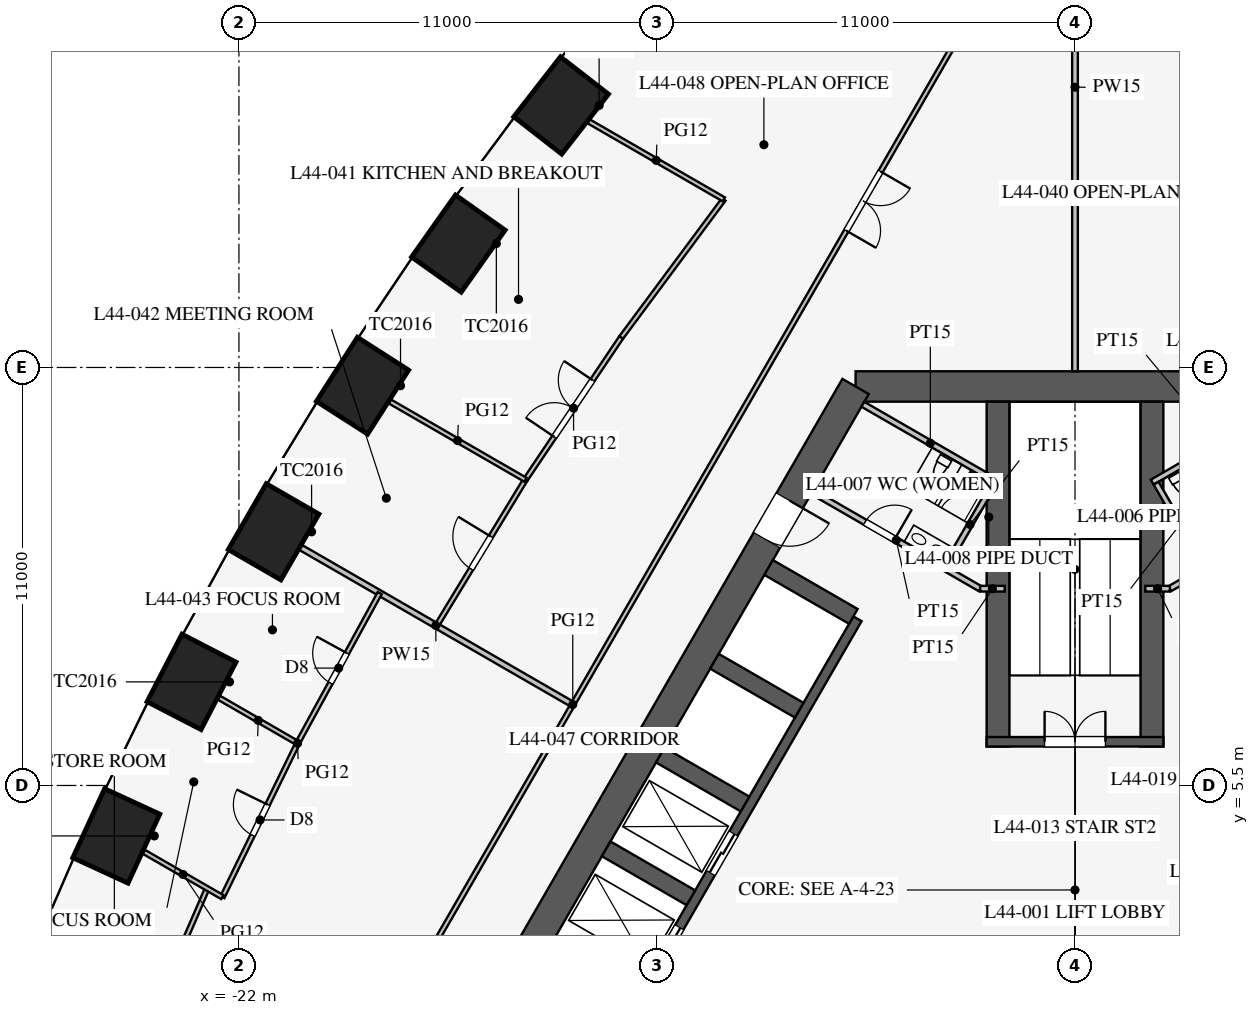
"""IFC4 building model, lengths in metres.
Left out: names, types, materials, properties, quantities, classifications, styles, units other than length and angle.
Written with IfcOpenShell. Run it as: python <this file> out.ifc"""

import sys

from ifc_helpers import new_model, si_unit, direction, frame, frame_2d, origin, origin_2d, place, context, subcontext, project, spatial, rectangle, extrude, element, fill, save


model = new_model("IFC4")
c1 = context("Model", 3, precision=1e-05, world=origin(), true_north=direction((0.0, 1.0)))
c2 = subcontext(c1, "Body", "Model", "MODEL_VIEW")
j1 = project(units=[si_unit("LENGTHUNIT", "METRE"), si_unit("PLANEANGLEUNIT", "RADIAN")], contexts=[c1])
p1 = place(None, origin())
s1 = spatial("IfcSite", under=j1, at=p1, CompositionType="ELEMENT")
p2 = place(p1, origin())
s2 = spatial("IfcBuilding", under=s1, at=p2, CompositionType="ELEMENT")
p3 = place(p2, frame((0.0, 0.0, 193.9)))
s3 = spatial("IfcBuildingStorey", under=s2, at=p3, CompositionType="ELEMENT", Elevation=193.9)
for number, where, z_axis, x_axis in (
    (1, (-13.522, 23.396, 0.0), (0.0, 0.0, 1.0), (-0.615, -0.789, 0.0)),
    (2, (-16.227, 19.761, 0.0), (0.0, 0.0, 1.0), (-0.577, -0.816, 0.0)),
    (3, (-18.748, 16.02, 0.0), (0.0, 0.0, 1.0), (-0.539, -0.842, 0.0)),
    (4, (-21.088, 12.175, 0.0), (0.0, 0.0, 1.0), (-0.5, -0.866, 0.0)),
    (5, (-23.248, 8.226, 0.0), (0.0, 0.0, 1.0), (-0.46, -0.888, 0.0)),
    (6, (-25.227, 4.172, 0.0), (0.0, 0.0, 1.0), (-0.418, -0.908, 0.0)),
):
    element("IfcColumn", number, at=place(p3, frame(where, z_axis=z_axis, x_axis=x_axis)), inside=s3, PredefinedType="COLUMN", context=c2, shape_type="SweptSolid", body=[
        extrude(rectangle(XDim=2.0, YDim=1.6, at=origin_2d()), origin(), (0.0, 0.0, 1.0), 4.2),
    ])
p4 = place(p3, frame((5.773, 16.0, 0.0), z_axis=(0.0, 0.0, 1.0), x_axis=(-1.0, 0.0, 0.0)))
e7 = element("IfcWall", 7, at=p4, inside=s3, PredefinedType="SHEAR", context=c2, shape_type="SweptSolid", body=[
    extrude(rectangle(XDim=11.547, YDim=0.8, at=frame_2d((5.773, 0.0))), origin(), (0.0, 0.0, 1.0), 4.2),
])
p5 = place(p3, frame((-5.773, 16.0, 0.0), z_axis=(0.0, 0.0, 1.0), x_axis=(-0.500002442456, -0.866023993627, 0.0)))
e8 = element("IfcWall", 8, at=p5, inside=s3, PredefinedType="SHEAR", context=c2, shape_type="SweptSolid", body=[
    extrude(rectangle(XDim=21.939, YDim=0.8, at=frame_2d((10.97, 0.0))), origin(), (0.0, 0.0, 1.0), 4.2),
])
p6 = place(p5, frame((17.27, 0.0, 0.0)))
e9 = element("IfcOpeningElement", 9, at=p6, cuts=e8, PredefinedType="OPENING", context=c2, shape_type="SweptSolid", body=[
    extrude(rectangle(XDim=1.2, YDim=2.1, at=frame_2d((0.6, 1.05))), frame((0.0, 0.41, 0.0), z_axis=(0.0, -1.0, 0.0), x_axis=(1.0, 0.0, 0.0)), (0.0, 0.0, 1.0), 0.82),
])
p7 = place(p5, frame((3.47, 0.0, 0.0)))
e10 = element("IfcOpeningElement", 10, at=p7, cuts=e8, PredefinedType="OPENING", context=c2, shape_type="SweptSolid", body=[
    extrude(rectangle(XDim=1.2, YDim=2.1, at=frame_2d((0.6, 1.05))), frame((0.0, 0.41, 0.0), z_axis=(0.0, -1.0, 0.0), x_axis=(1.0, 0.0, 0.0)), (0.0, 0.0, 1.0), 0.82),
])
p8 = place(p3, frame((-5.724, 9.886, 0.0), z_axis=(0.0, 0.0, 1.0), x_axis=(-0.500001763848, -0.866024385424, 0.0)))
e11 = element("IfcWall", 11, at=p8, inside=s3, PredefinedType="SHEAR", context=c2, shape_type="SweptSolid", body=[
    extrude(rectangle(XDim=11.4, YDim=0.25, at=frame_2d((5.7, 0.0))), origin(), (0.0, 0.0, 1.0), 4.2),
])
p9 = place(p8, frame((6.525, 0.0, 0.0)))
e12 = element("IfcOpeningElement", 12, at=p9, cuts=e11, PredefinedType="OPENING", context=c2, shape_type="SweptSolid", body=[
    extrude(rectangle(XDim=1.2, YDim=2.2, at=frame_2d((0.6, 1.1))), frame((0.0, 0.135, 0.0), z_axis=(0.0, -1.0, 0.0), x_axis=(1.0, 0.0, 0.0)), (0.0, 0.0, 1.0), 0.27),
])
p10 = place(p8, frame((9.375, 0.0, 0.0)))
e13 = element("IfcOpeningElement", 13, at=p10, cuts=e11, PredefinedType="OPENING", context=c2, shape_type="SweptSolid", body=[
    extrude(rectangle(XDim=1.2, YDim=2.2, at=frame_2d((0.6, 1.1))), frame((0.0, 0.135, 0.0), z_axis=(0.0, -1.0, 0.0), x_axis=(1.0, 0.0, 0.0)), (0.0, 0.0, 1.0), 0.27),
])
p11 = place(p3, frame((-5.832, 9.949, 0.0), z_axis=(0.0, 0.0, 1.0), x_axis=(-0.866029291668, 0.499993265928, 0.0)))
e14 = element("IfcWall", 14, at=p11, inside=s3, PredefinedType="SHEAR", context=c2, shape_type="SweptSolid", body=[
    extrude(rectangle(XDim=2.575, YDim=0.45, at=frame_2d((1.288, 0.0))), origin(), (0.0, 0.0, 1.0), 4.2),
])
for number, where, z_axis, x_axis in (
    (15, (-7.257, 7.481, 0.0), (0.0, 0.0, 1.0), (-0.866, 0.5, 0.0)),
    (16, (-8.682, 5.012, 0.0), (0.0, 0.0, 1.0), (-0.866, 0.5, 0.0)),
    (17, (-10.107, 2.544, 0.0), (0.0, 0.0, 1.0), (-0.866, 0.5, 0.0)),
):
    element("IfcWall", number, at=place(p3, frame(where, z_axis=z_axis, x_axis=x_axis)), inside=s3, PredefinedType="SHEAR", context=c2, shape_type="SweptSolid", body=[
        extrude(rectangle(XDim=2.575, YDim=0.45, at=frame_2d((1.288, 0.0))), origin(), (0.0, 0.0, 1.0), 4.2),
    ])
for number, where, z_axis, x_axis in (
    (18, (2.025, 6.525, 0.0), (0.0, 0.0, 1.0), (0.0, 1.0, 0.0)),
    (19, (-2.025, 6.525, 0.0), (0.0, 0.0, 1.0), (0.0, 1.0, 0.0)),
):
    element("IfcWall", number, at=place(p3, frame(where, z_axis=z_axis, x_axis=x_axis)), inside=s3, PredefinedType="SHEAR", context=c2, shape_type="SweptSolid", body=[
        extrude(rectangle(XDim=9.075, YDim=0.6, at=frame_2d((4.538, 0.0))), origin(), (0.0, 0.0, 1.0), 4.2),
    ])
p12 = place(p3, frame((2.325, 6.65, 0.0), z_axis=(0.0, 0.0, 1.0), x_axis=(-1.0, 0.0, 0.0)))
e20 = element("IfcWall", 20, at=p12, inside=s3, PredefinedType="SHEAR", context=c2, shape_type="SweptSolid", body=[
    extrude(rectangle(XDim=4.65, YDim=0.25, at=frame_2d((2.325, 0.0))), origin(), (0.0, 0.0, 1.0), 4.2),
])
p13 = place(p12, frame((1.525, 0.0, 0.0)))
e21 = element("IfcOpeningElement", 21, at=p13, cuts=e20, PredefinedType="OPENING", context=c2, shape_type="SweptSolid", body=[
    extrude(rectangle(XDim=1.6, YDim=2.1, at=frame_2d((0.8, 1.05))), frame((0.0, 0.135, 0.0), z_axis=(0.0, -1.0, 0.0), x_axis=(1.0, 0.0, 0.0)), (0.0, 0.0, 1.0), 0.27),
])
p14 = place(p3, frame((2.495, 10.678, 0.0), z_axis=(0.0, 0.0, 1.0), x_axis=(0.86602216432, 0.500005610874, 0.0)))
e22 = element("IfcWall", 22, at=p14, inside=s3, PredefinedType="PARTITIONING", context=c2, shape_type="SweptSolid", body=[
    extrude(rectangle(XDim=5.1, YDim=0.15, at=frame_2d((2.55, 0.0))), origin(), (0.0, 0.0, 1.0), 4.0),
])
p15 = place(p14, frame((1.3, 0.0, 0.0)))
e23 = element("IfcOpeningElement", 23, at=p15, cuts=e22, PredefinedType="OPENING", context=c2, shape_type="SweptSolid", body=[
    extrude(rectangle(XDim=0.9, YDim=2.1, at=frame_2d((0.45, 1.05))), frame((0.0, 0.085, 0.0), z_axis=(0.0, -1.0, 0.0), x_axis=(1.0, 0.0, 0.0)), (0.0, 0.0, 1.0), 0.17),
])
p16 = place(p3, frame((-2.495, 10.678, 0.0), z_axis=(0.0, 0.0, 1.0), x_axis=(-0.86602216432, 0.500005610874, 0.0)))
e24 = element("IfcWall", 24, at=p16, inside=s3, PredefinedType="PARTITIONING", context=c2, shape_type="SweptSolid", body=[
    extrude(rectangle(XDim=5.1, YDim=0.15, at=frame_2d((2.55, 0.0))), origin(), (0.0, 0.0, 1.0), 4.0),
])
p17 = place(p16, frame((2.6, 0.0, 0.0)))
e25 = element("IfcOpeningElement", 25, at=p17, cuts=e24, PredefinedType="OPENING", context=c2, shape_type="SweptSolid", body=[
    extrude(rectangle(XDim=0.9, YDim=2.1, at=frame_2d((0.45, 1.05))), frame((0.0, 0.085, 0.0), z_axis=(0.0, -1.0, 0.0), x_axis=(1.0, 0.0, 0.0)), (0.0, 0.0, 1.0), 0.17),
])
for number, where, z_axis, x_axis in (
    (26, (2.495, 10.678, 0.0), (0.0, 0.0, 1.0), (-1.0, 0.0, 0.0)),
    (27, (-2.495, 10.678, 0.0), (0.0, 0.0, 1.0), (1.0, 0.0, 0.0)),
):
    element("IfcWall", number, at=place(p3, frame(where, z_axis=z_axis, x_axis=x_axis)), inside=s3, PredefinedType="PARTITIONING", context=c2, shape_type="SweptSolid", body=[
        extrude(rectangle(XDim=0.645, YDim=0.15, at=frame_2d((0.323, 0.0))), origin(), (0.0, 0.0, 1.0), 4.0),
    ])
p18 = place(p3, frame((2.031, 13.482, 0.0), z_axis=(0.0, 0.0, 1.0), x_axis=(0.866050731258, 0.499956128963, 0.0)))
e28 = element("IfcWall", 28, at=p18, inside=s3, PredefinedType="PARTITIONING", context=c2, shape_type="SweptSolid", body=[
    extrude(rectangle(XDim=4.1, YDim=0.15, at=frame_2d((2.05, 0.0))), origin(), (0.0, 0.0, 1.0), 4.0),
])
p19 = place(p3, frame((3.389, 11.281, 0.0), z_axis=(0.0, 0.0, 1.0), x_axis=(-0.499989096993, 0.866031698547, 0.0)))
e29 = element("IfcWall", 29, at=p19, inside=s3, PredefinedType="PARTITIONING", context=c2, shape_type="SweptSolid", body=[
    extrude(rectangle(XDim=2.51, YDim=0.15, at=frame_2d((1.255, 0.0))), origin(), (0.0, 0.0, 1.0), 4.0),
])
p20 = place(p3, frame((-2.031, 13.482, 0.0), z_axis=(0.0, 0.0, 1.0), x_axis=(-0.866050731258, 0.499956128963, 0.0)))
e30 = element("IfcWall", 30, at=p20, inside=s3, PredefinedType="PARTITIONING", context=c2, shape_type="SweptSolid", body=[
    extrude(rectangle(XDim=4.1, YDim=0.15, at=frame_2d((2.05, 0.0))), origin(), (0.0, 0.0, 1.0), 4.0),
])
p21 = place(p3, frame((-3.389, 11.281, 0.0), z_axis=(0.0, 0.0, 1.0), x_axis=(0.499989096993, 0.866031698547, 0.0)))
e31 = element("IfcWall", 31, at=p21, inside=s3, PredefinedType="PARTITIONING", context=c2, shape_type="SweptSolid", body=[
    extrude(rectangle(XDim=2.51, YDim=0.15, at=frame_2d((1.255, 0.0))), origin(), (0.0, 0.0, 1.0), 4.0),
])
p22 = place(p3, frame((0.0, 16.4, 0.0), z_axis=(0.0, 0.0, 1.0), x_axis=(0.0, 1.0, 0.0)))
e32 = element("IfcWall", 32, at=p22, inside=s3, PredefinedType="PARTITIONING", context=c2, shape_type="SweptSolid", body=[
    extrude(rectangle(XDim=14.95, YDim=0.15, at=frame_2d((7.475, 0.0))), origin(), (0.0, 0.0, 1.0), 2.4),
])
p23 = place(p3, frame((26.415, -15.231, 0.0), z_axis=(0.0, 0.0, 1.0), x_axis=(-0.50000091641, 0.866024874695, 0.0)))
e33 = element("IfcWall", 33, at=p23, inside=s3, PredefinedType="PARTITIONING", context=c2, shape_type="SweptSolid", body=[
    extrude(rectangle(XDim=52.796, YDim=0.12, at=frame_2d((26.398, 0.0))), origin(), (0.0, 0.0, 1.0), 2.9),
])
p24 = place(p23, frame((10.2, 0.0, 0.15)))
e34 = element("IfcOpeningElement", 34, at=p24, cuts=e33, PredefinedType="OPENING", context=c2, shape_type="SweptSolid", body=[
    extrude(rectangle(XDim=1.8, YDim=2.1, at=frame_2d((0.9, 1.05))), frame((0.0, 0.07, 0.0), z_axis=(0.0, -1.0, 0.0), x_axis=(1.0, 0.0, 0.0)), (0.0, 0.0, 1.0), 0.14),
])
p25 = place(p23, frame((40.8, 0.0, 0.15)))
e35 = element("IfcOpeningElement", 35, at=p25, cuts=e33, PredefinedType="OPENING", context=c2, shape_type="SweptSolid", body=[
    extrude(rectangle(XDim=1.8, YDim=2.1, at=frame_2d((0.9, 1.05))), frame((0.0, 0.07, 0.0), z_axis=(0.0, -1.0, 0.0), x_axis=(1.0, 0.0, 0.0)), (0.0, 0.0, 1.0), 0.14),
])
p26 = place(p3, frame((-13.268, 7.66, 0.0), z_axis=(0.0, 0.0, 1.0), x_axis=(-0.866019499219, 0.500010226868, 0.0)))
e36 = element("IfcWall", 36, at=p26, inside=s3, PredefinedType="PARTITIONING", context=c2, shape_type="SweptSolid", body=[
    extrude(rectangle(XDim=8.2, YDim=0.15, at=frame_2d((4.1, 0.0))), origin(), (0.0, 0.0, 1.0), 2.992),
])
p27 = place(p3, frame((-0.016, 30.491, 0.0), z_axis=(0.0, 0.0, 1.0), x_axis=(-0.50000091641, -0.866024874695, 0.0)))
e37 = element("IfcWall", 37, at=p27, inside=s3, PredefinedType="PARTITIONING", context=c2, shape_type="SweptSolid", body=[
    extrude(rectangle(XDim=52.796, YDim=0.12, at=frame_2d((26.398, 0.0))), origin(), (0.0, 0.0, 1.0), 2.9),
])
p28 = place(p27, frame((10.2, 0.0, 0.15)))
e38 = element("IfcOpeningElement", 38, at=p28, cuts=e37, PredefinedType="OPENING", context=c2, shape_type="SweptSolid", body=[
    extrude(rectangle(XDim=1.8, YDim=2.1, at=frame_2d((0.9, 1.05))), frame((0.0, 0.07, 0.0), z_axis=(0.0, -1.0, 0.0), x_axis=(1.0, 0.0, 0.0)), (0.0, 0.0, 1.0), 0.14),
])
p29 = place(p27, frame((40.8, 0.0, 0.15)))
e39 = element("IfcOpeningElement", 39, at=p29, cuts=e37, PredefinedType="OPENING", context=c2, shape_type="SweptSolid", body=[
    extrude(rectangle(XDim=1.8, YDim=2.1, at=frame_2d((0.9, 1.05))), frame((0.0, 0.07, 0.0), z_axis=(0.0, -1.0, 0.0), x_axis=(1.0, 0.0, 0.0)), (0.0, 0.0, 1.0), 0.14),
])
p30 = place(p3, frame((-18.295, 10.563, 0.0), z_axis=(0.0, 0.0, 1.0), x_axis=(-0.479972822547, -0.877283357654, 0.0)))
e40 = element("IfcWall", 40, at=p30, inside=s3, PredefinedType="PARTITIONING", context=c2, shape_type="SweptSolid", body=[
    extrude(rectangle(XDim=4.501, YDim=0.12, at=frame_2d((2.25, 0.0))), origin(), (0.0, 0.0, 1.0), 2.9),
])
p31 = place(p30, frame((1.8, 0.0, 0.15)))
e41 = element("IfcOpeningElement", 41, at=p31, cuts=e40, PredefinedType="OPENING", context=c2, shape_type="SweptSolid", body=[
    extrude(rectangle(XDim=0.9, YDim=2.1, at=frame_2d((0.45, 1.05))), frame((0.0, 0.07, 0.0), z_axis=(0.0, -1.0, 0.0), x_axis=(1.0, 0.0, 0.0)), (0.0, 0.0, 1.0), 0.14),
])
p32 = place(p3, frame((-20.456, 6.614, 0.0), z_axis=(0.0, 0.0, 1.0), x_axis=(-0.43911984878, -0.898428493764, 0.0)))
e42 = element("IfcWall", 42, at=p32, inside=s3, PredefinedType="PARTITIONING", context=c2, shape_type="SweptSolid", body=[
    extrude(rectangle(XDim=4.511, YDim=0.12, at=frame_2d((2.255, 0.0))), origin(), (0.0, 0.0, 1.0), 2.9),
])
p33 = place(p32, frame((1.8, 0.0, 0.15)))
e43 = element("IfcOpeningElement", 43, at=p33, cuts=e42, PredefinedType="OPENING", context=c2, shape_type="SweptSolid", body=[
    extrude(rectangle(XDim=0.9, YDim=2.1, at=frame_2d((0.45, 1.05))), frame((0.0, 0.07, 0.0), z_axis=(0.0, -1.0, 0.0), x_axis=(1.0, 0.0, 0.0)), (0.0, 0.0, 1.0), 0.14),
])
p34 = place(p3, frame((-22.835, 2.792, 0.0), z_axis=(0.0, 0.0, 1.0), x_axis=(-0.397208101111, -0.917728567939, 0.0)))
e44 = element("IfcWall", 44, at=p34, inside=s3, PredefinedType="PARTITIONING", context=c2, shape_type="SweptSolid", body=[
    extrude(rectangle(XDim=4.53, YDim=0.12, at=frame_2d((2.265, 0.0))), origin(), (0.0, 0.0, 1.0), 2.9),
])
p35 = place(p34, frame((1.8, 0.0, 0.15)))
e45 = element("IfcOpeningElement", 45, at=p35, cuts=e44, PredefinedType="OPENING", context=c2, shape_type="SweptSolid", body=[
    extrude(rectangle(XDim=0.9, YDim=2.1, at=frame_2d((0.45, 1.05))), frame((0.0, 0.07, 0.0), z_axis=(0.0, -1.0, 0.0), x_axis=(1.0, 0.0, 0.0)), (0.0, 0.0, 1.0), 0.14),
])
p36 = place(p3, frame((-9.242, 20.924, 0.0), z_axis=(0.0, 0.0, 1.0), x_axis=(-0.59613842716, -0.802881669777, 0.0)))
e46 = element("IfcWall", 46, at=p36, inside=s3, PredefinedType="PARTITIONING", context=c2, shape_type="SweptSolid", body=[
    extrude(rectangle(XDim=4.53, YDim=0.12, at=frame_2d((2.265, 0.0))), origin(), (0.0, 0.0, 1.0), 2.9),
])
p37 = place(p3, frame((-14.462, 13.546, 0.0), z_axis=(0.0, 0.0, 1.0), x_axis=(-0.519790350351, -0.85429385558, 0.0)))
e47 = element("IfcWall", 47, at=p37, inside=s3, PredefinedType="PARTITIONING", context=c2, shape_type="SweptSolid", body=[
    extrude(rectangle(XDim=4.501, YDim=0.12, at=frame_2d((2.25, 0.0))), origin(), (0.0, 0.0, 1.0), 2.9),
])
p38 = place(p37, frame((1.75, 0.0, 0.15)))
e48 = element("IfcOpeningElement", 48, at=p38, cuts=e47, PredefinedType="OPENING", context=c2, shape_type="SweptSolid", body=[
    extrude(rectangle(XDim=1.0, YDim=2.1, at=frame_2d((0.5, 1.05))), frame((0.0, 0.07, 0.0), z_axis=(0.0, -1.0, 0.0), x_axis=(1.0, 0.0, 0.0)), (0.0, 0.0, 1.0), 0.14),
])
p39 = place(p3, frame((-11.943, 17.287, 0.0), z_axis=(0.0, 0.0, 1.0), x_axis=(-0.55850386778, -0.829501916619, 0.0)))
e49 = element("IfcWall", 49, at=p39, inside=s3, PredefinedType="PARTITIONING", context=c2, shape_type="SweptSolid", body=[
    extrude(rectangle(XDim=4.511, YDim=0.12, at=frame_2d((2.255, 0.0))), origin(), (0.0, 0.0, 1.0), 2.9),
])
p40 = place(p39, frame((1.35, 0.0, 0.15)))
e50 = element("IfcOpeningElement", 50, at=p40, cuts=e49, PredefinedType="OPENING", context=c2, shape_type="SweptSolid", body=[
    extrude(rectangle(XDim=1.8, YDim=2.1, at=frame_2d((0.9, 1.05))), frame((0.0, 0.07, 0.0), z_axis=(0.0, -1.0, 0.0), x_axis=(1.0, 0.0, 0.0)), (0.0, 0.0, 1.0), 0.14),
])
p41 = place(p3, frame((-20.456, 6.614, 0.0), z_axis=(0.0, 0.0, 1.0), x_axis=(-0.866030989016, 0.499990325971, 0.0)))
e51 = element("IfcWall", 51, at=p41, inside=s3, PredefinedType="PARTITIONING", context=c2, shape_type="SweptSolid", body=[
    extrude(rectangle(XDim=2.393, YDim=0.12, at=frame_2d((1.197, 0.0))), origin(), (0.0, 0.0, 1.0), 2.9),
])
p42 = place(p3, frame((-22.437, 2.562, 0.0), z_axis=(0.0, 0.0, 1.0), x_axis=(-0.866013634004, 0.500020385304, 0.0)))
e52 = element("IfcWall", 52, at=p42, inside=s3, PredefinedType="PARTITIONING", context=c2, shape_type="SweptSolid", body=[
    extrude(rectangle(XDim=2.388, YDim=0.12, at=frame_2d((1.194, 0.0))), origin(), (0.0, 0.0, 1.0), 2.9),
])
p43 = place(p3, frame((-9.242, 20.924, 0.0), z_axis=(0.0, 0.0, 1.0), x_axis=(-0.866016197294, 0.500015945769, 0.0)))
e53 = element("IfcWall", 53, at=p43, inside=s3, PredefinedType="PARTITIONING", context=c2, shape_type="SweptSolid", body=[
    extrude(rectangle(XDim=4.104, YDim=0.12, at=frame_2d((2.052, 0.0))), origin(), (0.0, 0.0, 1.0), 2.8),
])
p44 = place(p3, frame((-14.462, 13.546, 0.0), z_axis=(0.0, 0.0, 1.0), x_axis=(-0.865998005666, 0.50004745193, 0.0)))
e54 = element("IfcWall", 54, at=p44, inside=s3, PredefinedType="PARTITIONING", context=c2, shape_type="SweptSolid", body=[
    extrude(rectangle(XDim=4.118, YDim=0.12, at=frame_2d((2.059, 0.0))), origin(), (0.0, 0.0, 1.0), 2.9),
])
p45 = place(p17, frame((0.9, 0.0, 0.0), z_axis=(0.0, 0.0, 1.0), x_axis=(-1.0, 0.0, 0.0)))
e55 = element("IfcDoor", 55, at=p45, inside=s3, OperationType="SINGLE_SWING_RIGHT", PredefinedType="DOOR", context=c2, shape_type="SweptSolid", body=[
    extrude(rectangle(XDim=0.9, YDim=2.1, at=frame_2d((0.45, 1.05))), frame((0.0, 0.025, 0.0), z_axis=(0.0, -1.0, 0.0), x_axis=(1.0, 0.0, 0.0)), (0.0, 0.0, 1.0), 0.05),
])
fill(e25, e55)
p46 = place(p13, frame((1.6, 0.0, 0.0), z_axis=(0.0, 0.0, 1.0), x_axis=(-1.0, 0.0, 0.0)))
e56 = element("IfcDoor", 56, at=p46, inside=s3, OperationType="DOUBLE_DOOR_SINGLE_SWING", PredefinedType="DOOR", context=c2, shape_type="SweptSolid", body=[
    extrude(rectangle(XDim=1.6, YDim=2.1, at=frame_2d((0.8, 1.05))), frame((0.0, 0.025, 0.0), z_axis=(0.0, -1.0, 0.0), x_axis=(1.0, 0.0, 0.0)), (0.0, 0.0, 1.0), 0.05),
])
fill(e21, e56)
p47 = place(p7, origin())
e57 = element("IfcDoor", 57, at=p47, inside=s3, OperationType="SINGLE_SWING_LEFT", PredefinedType="DOOR", context=c2, shape_type="SweptSolid", body=[
    extrude(rectangle(XDim=1.2, YDim=2.1, at=frame_2d((0.6, 1.05))), frame((0.0, 0.025, 0.0), z_axis=(0.0, -1.0, 0.0), x_axis=(1.0, 0.0, 0.0)), (0.0, 0.0, 1.0), 0.05),
])
fill(e10, e57)
p48 = place(p40, frame((1.8, 0.0, 0.0), z_axis=(0.0, 0.0, 1.0), x_axis=(-1.0, 0.0, 0.0)))
e58 = element("IfcDoor", 58, at=p48, inside=s3, OperationType="DOUBLE_DOOR_SINGLE_SWING", PredefinedType="DOOR", context=c2, shape_type="SweptSolid", body=[
    extrude(rectangle(XDim=1.8, YDim=2.1, at=frame_2d((0.9, 1.05))), frame((0.0, 0.025, 0.0), z_axis=(0.0, -1.0, 0.0), x_axis=(1.0, 0.0, 0.0)), (0.0, 0.0, 1.0), 0.05),
])
fill(e50, e58)
p49 = place(p38, frame((1.0, 0.0, 0.0), z_axis=(0.0, 0.0, 1.0), x_axis=(-1.0, 0.0, 0.0)))
e59 = element("IfcDoor", 59, at=p49, inside=s3, OperationType="SINGLE_SWING_RIGHT", PredefinedType="DOOR", context=c2, shape_type="SweptSolid", body=[
    extrude(rectangle(XDim=1.0, YDim=2.1, at=frame_2d((0.5, 1.05))), frame((0.0, 0.025, 0.0), z_axis=(0.0, -1.0, 0.0), x_axis=(1.0, 0.0, 0.0)), (0.0, 0.0, 1.0), 0.05),
])
fill(e48, e59)
p50 = place(p31, frame((0.9, 0.0, 0.0), z_axis=(0.0, 0.0, 1.0), x_axis=(-1.0, 0.0, 0.0)))
e60 = element("IfcDoor", 60, at=p50, inside=s3, OperationType="SINGLE_SWING_RIGHT", PredefinedType="DOOR", context=c2, shape_type="SweptSolid", body=[
    extrude(rectangle(XDim=0.9, YDim=2.1, at=frame_2d((0.45, 1.05))), frame((0.0, 0.025, 0.0), z_axis=(0.0, -1.0, 0.0), x_axis=(1.0, 0.0, 0.0)), (0.0, 0.0, 1.0), 0.05),
])
fill(e41, e60)
p51 = place(p33, frame((0.9, 0.0, 0.0), z_axis=(0.0, 0.0, 1.0), x_axis=(-1.0, 0.0, 0.0)))
e61 = element("IfcDoor", 61, at=p51, inside=s3, OperationType="SINGLE_SWING_RIGHT", PredefinedType="DOOR", context=c2, shape_type="SweptSolid", body=[
    extrude(rectangle(XDim=0.9, YDim=2.1, at=frame_2d((0.45, 1.05))), frame((0.0, 0.025, 0.0), z_axis=(0.0, -1.0, 0.0), x_axis=(1.0, 0.0, 0.0)), (0.0, 0.0, 1.0), 0.05),
])
fill(e43, e61)
p52 = place(p28, origin())
e62 = element("IfcDoor", 62, at=p52, inside=s3, OperationType="DOUBLE_DOOR_SINGLE_SWING", PredefinedType="DOOR", context=c2, shape_type="SweptSolid", body=[
    extrude(rectangle(XDim=1.8, YDim=2.1, at=frame_2d((0.9, 1.05))), frame((0.0, 0.025, 0.0), z_axis=(0.0, -1.0, 0.0), x_axis=(1.0, 0.0, 0.0)), (0.0, 0.0, 1.0), 0.05),
])
fill(e38, e62)
p53 = place(p9, origin())
e63 = element("IfcDoor", 63, at=p53, inside=s3, OperationType="DOUBLE_DOOR_SLIDING", PredefinedType="DOOR", context=c2, shape_type="SweptSolid", body=[
    extrude(rectangle(XDim=1.2, YDim=2.2, at=frame_2d((0.6, 1.1))), frame((0.0, 0.025, 0.0), z_axis=(0.0, -1.0, 0.0), x_axis=(1.0, 0.0, 0.0)), (0.0, 0.0, 1.0), 0.05),
])
fill(e12, e63)
p54 = place(p10, origin())
e64 = element("IfcDoor", 64, at=p54, inside=s3, OperationType="DOUBLE_DOOR_SLIDING", PredefinedType="DOOR", context=c2, shape_type="SweptSolid", body=[
    extrude(rectangle(XDim=1.2, YDim=2.2, at=frame_2d((0.6, 1.1))), frame((0.0, 0.025, 0.0), z_axis=(0.0, -1.0, 0.0), x_axis=(1.0, 0.0, 0.0)), (0.0, 0.0, 1.0), 0.05),
])
fill(e13, e64)
save(model, sys.argv[1])
